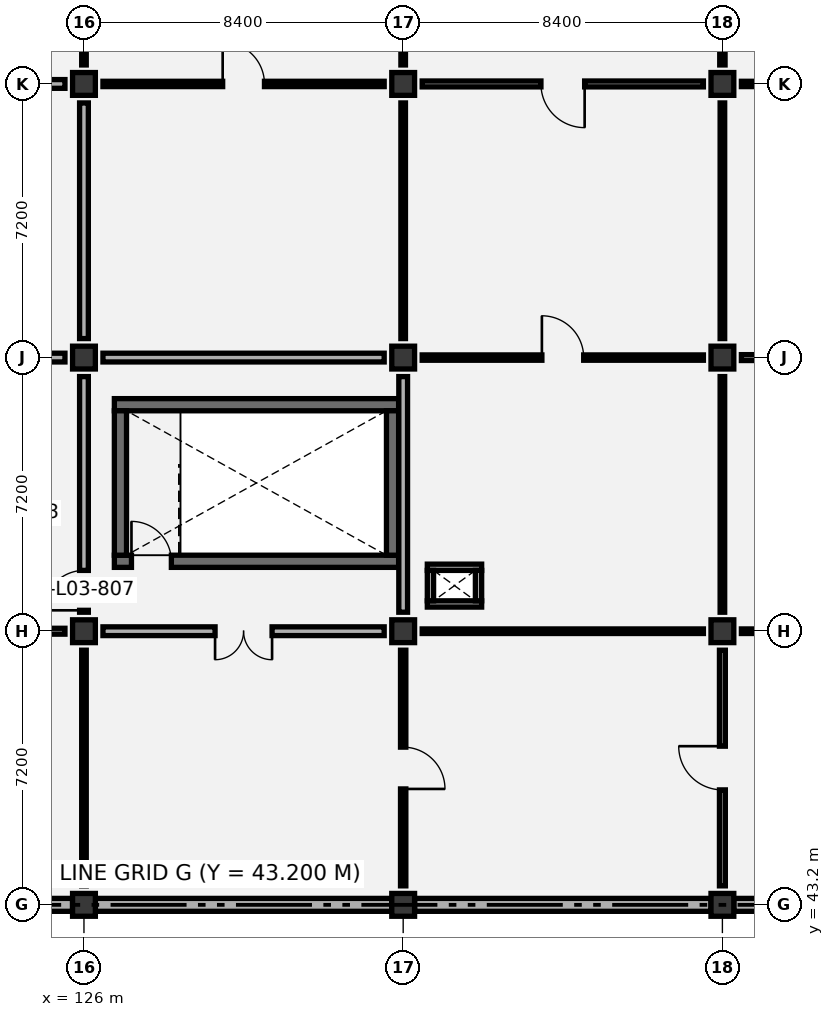
"""IFC4 building model, lengths in metres.
Left out: names, types, materials, properties, quantities, classifications, styles, units other than length and angle.
Written with IfcOpenShell. Run it as: python <this file> out.ifc"""

import sys

from ifc_helpers import new_model, si_unit, direction, frame, frame_2d, origin, origin_2d, place, context, subcontext, project, spatial, rectangle, extrude, element, fill, save


model = new_model("IFC4")
c1 = context("Model", 3, precision=1e-05, world=origin(), true_north=direction((0.0, 1.0)))
c2 = subcontext(c1, "Body", "Model", "MODEL_VIEW")
j1 = project(units=[si_unit("LENGTHUNIT", "METRE"), si_unit("PLANEANGLEUNIT", "RADIAN")], contexts=[c1])
p1 = place(None, origin())
s1 = spatial("IfcSite", under=j1, at=p1, CompositionType="ELEMENT")
p2 = place(p1, origin())
s2 = spatial("IfcBuilding", under=s1, at=p2, CompositionType="ELEMENT")
p3 = place(p2, frame((0.0, 0.0, 16.8)))
s3 = spatial("IfcBuildingStorey", under=s2, at=p3, CompositionType="ELEMENT", Elevation=16.8)
for number, where, z_axis, x_axis in (
    (1, (126.0, 43.2, 0.0), (0.0, 0.0, 1.0), (1.0, 0.0, 0.0)),
    (2, (126.0, 50.4, 0.0), (0.0, 0.0, 1.0), (1.0, 0.0, 0.0)),
    (3, (126.0, 57.6, 0.0), (0.0, 0.0, 1.0), (1.0, 0.0, 0.0)),
    (4, (126.0, 64.8, 0.0), (0.0, 0.0, 1.0), (1.0, 0.0, 0.0)),
    (5, (134.4, 43.2, 0.0), (0.0, 0.0, 1.0), (1.0, 0.0, 0.0)),
    (6, (134.4, 50.4, 0.0), (0.0, 0.0, 1.0), (1.0, 0.0, 0.0)),
    (7, (134.4, 57.6, 0.0), (0.0, 0.0, 1.0), (1.0, 0.0, 0.0)),
    (8, (134.4, 64.8, 0.0), (0.0, 0.0, 1.0), (1.0, 0.0, 0.0)),
    (9, (142.8, 43.2, 0.0), (0.0, 0.0, 1.0), (1.0, 0.0, 0.0)),
    (10, (142.8, 50.4, 0.0), (0.0, 0.0, 1.0), (1.0, 0.0, 0.0)),
    (11, (142.8, 57.6, 0.0), (0.0, 0.0, 1.0), (1.0, 0.0, 0.0)),
    (12, (142.8, 64.8, 0.0), (0.0, 0.0, 1.0), (1.0, 0.0, 0.0)),
):
    element("IfcColumn", number, at=place(p3, frame(where, z_axis=z_axis, x_axis=x_axis)), inside=s3, PredefinedType="COLUMN", context=c2, shape_type="SweptSolid", body=[
        extrude(rectangle(XDim=0.6, YDim=0.6, at=origin_2d()), origin(), (0.0, 0.0, 1.0), 5.4),
    ])
p4 = place(p3, frame((126.8, 52.24, 0.0), z_axis=(0.0, 0.0, 1.0), x_axis=(1.0, 0.0, 0.0)))
e13 = element("IfcWall", 13, at=p4, inside=s3, PredefinedType="SHEAR", context=c2, shape_type="SweptSolid", body=[
    extrude(rectangle(XDim=7.48, YDim=0.32, at=frame_2d((3.74, 0.0))), origin(), (0.0, 0.0, 1.0), 5.05),
])
p5 = place(p4, frame((0.45, 0.0, 0.0)))
e14 = element("IfcOpeningElement", 14, at=p5, cuts=e13, PredefinedType="OPENING", context=c2, shape_type="SweptSolid", body=[
    extrude(rectangle(XDim=1.05, YDim=2.15, at=frame_2d((0.525, 1.075))), frame((0.0, 0.17, 0.0), z_axis=(0.0, -1.0, 0.0), x_axis=(1.0, 0.0, 0.0)), (0.0, 0.0, 1.0), 0.34),
])
p6 = place(p3, frame((126.8, 56.36, 0.0), z_axis=(0.0, 0.0, 1.0), x_axis=(1.0, 0.0, 0.0)))
e15 = element("IfcWall", 15, at=p6, inside=s3, PredefinedType="SHEAR", context=c2, shape_type="SweptSolid", body=[
    extrude(rectangle(XDim=7.48, YDim=0.32, at=frame_2d((3.74, 0.0))), origin(), (0.0, 0.0, 1.0), 5.05),
])
for number, where, z_axis, x_axis in (
    (16, (126.96, 52.4, 0.0), (0.0, 0.0, 1.0), (0.0, 1.0, 0.0)),
    (17, (134.12, 52.4, 0.0), (0.0, 0.0, 1.0), (0.0, 1.0, 0.0)),
):
    element("IfcWall", number, at=place(p3, frame(where, z_axis=z_axis, x_axis=x_axis)), inside=s3, PredefinedType="SHEAR", context=c2, shape_type="SweptSolid", body=[
        extrude(rectangle(XDim=3.8, YDim=0.32, at=frame_2d((1.9, 0.0))), origin(), (0.0, 0.0, 1.0), 5.05),
    ])
p7 = place(p3, frame((118.0, 43.2, 0.0), z_axis=(0.0, 0.0, 1.0), x_axis=(1.0, 0.0, 0.0)))
e18 = element("IfcWall", 18, at=p7, inside=s3, PredefinedType="SOLIDWALL", context=c2, shape_type="SweptSolid", body=[
    extrude(rectangle(XDim=7.7, YDim=0.34, at=frame_2d((3.85, 0.0))), origin(), (0.0, 0.0, 1.0), 4.395),
])
for number, where, z_axis, x_axis in (
    (19, (126.3, 43.2, 0.0), (0.0, 0.0, 1.0), (1.0, 0.0, 0.0)),
    (20, (134.7, 43.2, 0.0), (0.0, 0.0, 1.0), (1.0, 0.0, 0.0)),
):
    element("IfcWall", number, at=place(p3, frame(where, z_axis=z_axis, x_axis=x_axis)), inside=s3, PredefinedType="SOLIDWALL", context=c2, shape_type="SweptSolid", body=[
        extrude(rectangle(XDim=7.8, YDim=0.34, at=frame_2d((3.9, 0.0))), origin(), (0.0, 0.0, 1.0), 4.395),
    ])
p8 = place(p3, frame((143.1, 43.2, 0.0), z_axis=(0.0, 0.0, 1.0), x_axis=(1.0, 0.0, 0.0)))
e21 = element("IfcWall", 21, at=p8, inside=s3, PredefinedType="SOLIDWALL", context=c2, shape_type="SweptSolid", body=[
    extrude(rectangle(XDim=7.8, YDim=0.34, at=frame_2d((3.9, 0.0))), origin(), (0.0, 0.0, 1.0), 4.395),
])
for number, where, z_axis, x_axis in (
    (22, (135.035, 51.117, 0.0), (0.0, 0.0, 1.0), (1.0, 0.0, 0.0)),
    (23, (135.035, 52.083, 0.0), (0.0, 0.0, 1.0), (1.0, 0.0, 0.0)),
):
    element("IfcWall", number, at=place(p3, frame(where, z_axis=z_axis, x_axis=x_axis)), inside=s3, PredefinedType="PARTITIONING", context=c2, shape_type="SweptSolid", body=[
        extrude(rectangle(XDim=1.43, YDim=0.165, at=frame_2d((0.715, 0.0))), origin(), (0.0, 0.0, 1.0), 4.825),
    ])
for number, where, z_axis, x_axis in (
    (24, (135.117, 51.2, 0.0), (0.0, 0.0, 1.0), (0.0, 1.0, 0.0)),
    (25, (136.383, 51.2, 0.0), (0.0, 0.0, 1.0), (0.0, 1.0, 0.0)),
):
    element("IfcWall", number, at=place(p3, frame(where, z_axis=z_axis, x_axis=x_axis)), inside=s3, PredefinedType="PARTITIONING", context=c2, shape_type="SweptSolid", body=[
        extrude(rectangle(XDim=0.8, YDim=0.165, at=frame_2d((0.4, 0.0))), origin(), (0.0, 0.0, 1.0), 4.825),
    ])
p9 = place(p3, frame((126.0, 43.7, 0.0), z_axis=(0.0, 0.0, 1.0), x_axis=(0.0, 1.0, 0.0)))
e26 = element("IfcWall", 26, at=p9, inside=s3, PredefinedType="PARTITIONING", context=c2, shape_type="SweptSolid", body=[
    extrude(rectangle(XDim=6.2, YDim=0.12, at=frame_2d((3.1, 0.0))), origin(), (0.0, 0.0, 1.0), 4.645),
])
p10 = place(p3, frame((118.1, 50.4, 0.0), z_axis=(0.0, 0.0, 1.0), x_axis=(1.0, 0.0, 0.0)))
e27 = element("IfcWall", 27, at=p10, inside=s3, PredefinedType="PARTITIONING", context=c2, shape_type="SweptSolid", body=[
    extrude(rectangle(XDim=7.4, YDim=0.155, at=frame_2d((3.7, 0.0))), origin(), (0.0, 0.0, 1.0), 4.295),
])
p11 = place(p10, frame((3.15, 0.0, 0.0)))
e28 = element("IfcOpeningElement", 28, at=p11, cuts=e27, PredefinedType="OPENING", context=c2, shape_type="SweptSolid", body=[
    extrude(rectangle(XDim=1.1, YDim=2.1, at=frame_2d((0.55, 1.05))), frame((0.0, 0.087, 0.0), z_axis=(0.0, -1.0, 0.0), x_axis=(1.0, 0.0, 0.0)), (0.0, 0.0, 1.0), 0.175),
])
p12 = place(p3, frame((126.0, 50.9, 0.0), z_axis=(0.0, 0.0, 1.0), x_axis=(0.0, 1.0, 0.0)))
e29 = element("IfcWall", 29, at=p12, inside=s3, PredefinedType="PARTITIONING", context=c2, shape_type="SweptSolid", body=[
    extrude(rectangle(XDim=6.2, YDim=0.23, at=frame_2d((3.1, 0.0))), origin(), (0.0, 0.0, 1.0), 4.345),
])
p13 = place(p12, frame((0.05, 0.0, 0.0)))
e30 = element("IfcOpeningElement", 30, at=p13, cuts=e29, PredefinedType="OPENING", context=c2, shape_type="SweptSolid", body=[
    extrude(rectangle(XDim=1.05, YDim=2.15, at=frame_2d((0.525, 1.075))), frame((0.0, 0.125, 0.0), z_axis=(0.0, -1.0, 0.0), x_axis=(1.0, 0.0, 0.0)), (0.0, 0.0, 1.0), 0.25),
])
p14 = place(p3, frame((118.1, 57.6, 0.0), z_axis=(0.0, 0.0, 1.0), x_axis=(1.0, 0.0, 0.0)))
e31 = element("IfcWall", 31, at=p14, inside=s3, PredefinedType="PARTITIONING", context=c2, shape_type="SweptSolid", body=[
    extrude(rectangle(XDim=7.4, YDim=0.23, at=frame_2d((3.7, 0.0))), origin(), (0.0, 0.0, 1.0), 4.295),
])
p15 = place(p14, frame((2.95, 0.0, 0.0)))
e32 = element("IfcOpeningElement", 32, at=p15, cuts=e31, PredefinedType="OPENING", context=c2, shape_type="SweptSolid", body=[
    extrude(rectangle(XDim=1.5, YDim=2.15, at=frame_2d((0.75, 1.075))), frame((0.0, 0.125, 0.0), z_axis=(0.0, -1.0, 0.0), x_axis=(1.0, 0.0, 0.0)), (0.0, 0.0, 1.0), 0.25),
])
p16 = place(p3, frame((126.0, 58.1, 0.0), z_axis=(0.0, 0.0, 1.0), x_axis=(0.0, 1.0, 0.0)))
e33 = element("IfcWall", 33, at=p16, inside=s3, PredefinedType="PARTITIONING", context=c2, shape_type="SweptSolid", body=[
    extrude(rectangle(XDim=6.2, YDim=0.23, at=frame_2d((3.1, 0.0))), origin(), (0.0, 0.0, 1.0), 4.755),
])
p17 = place(p3, frame((118.1, 64.8, 0.0), z_axis=(0.0, 0.0, 1.0), x_axis=(1.0, 0.0, 0.0)))
e34 = element("IfcWall", 34, at=p17, inside=s3, PredefinedType="PARTITIONING", context=c2, shape_type="SweptSolid", body=[
    extrude(rectangle(XDim=7.4, YDim=0.23, at=frame_2d((3.7, 0.0))), origin(), (0.0, 0.0, 1.0), 4.295),
])
p18 = place(p3, frame((126.0, 65.3, 0.0), z_axis=(0.0, 0.0, 1.0), x_axis=(0.0, 1.0, 0.0)))
e35 = element("IfcWall", 35, at=p18, inside=s3, PredefinedType="PARTITIONING", context=c2, shape_type="SweptSolid", body=[
    extrude(rectangle(XDim=6.2, YDim=0.12, at=frame_2d((3.1, 0.0))), origin(), (0.0, 0.0, 1.0), 4.345),
])
p19 = place(p3, frame((134.4, 43.7, 0.0), z_axis=(0.0, 0.0, 1.0), x_axis=(0.0, 1.0, 0.0)))
e36 = element("IfcWall", 36, at=p19, inside=s3, PredefinedType="PARTITIONING", context=c2, shape_type="SweptSolid", body=[
    extrude(rectangle(XDim=6.2, YDim=0.14, at=frame_2d((3.1, 0.0))), origin(), (0.0, 0.0, 1.0), 4.345),
])
p20 = place(p19, frame((2.55, 0.0, 0.0)))
e37 = element("IfcOpeningElement", 37, at=p20, cuts=e36, PredefinedType="OPENING", context=c2, shape_type="SweptSolid", body=[
    extrude(rectangle(XDim=1.1, YDim=2.1, at=frame_2d((0.55, 1.05))), frame((0.0, 0.08, 0.0), z_axis=(0.0, -1.0, 0.0), x_axis=(1.0, 0.0, 0.0)), (0.0, 0.0, 1.0), 0.16),
])
p21 = place(p3, frame((126.5, 50.4, 0.0), z_axis=(0.0, 0.0, 1.0), x_axis=(1.0, 0.0, 0.0)))
e38 = element("IfcWall", 38, at=p21, inside=s3, PredefinedType="PARTITIONING", context=c2, shape_type="SweptSolid", body=[
    extrude(rectangle(XDim=7.4, YDim=0.23, at=frame_2d((3.7, 0.0))), origin(), (0.0, 0.0, 1.0), 4.295),
])
p22 = place(p21, frame((2.95, 0.0, 0.0)))
e39 = element("IfcOpeningElement", 39, at=p22, cuts=e38, PredefinedType="OPENING", context=c2, shape_type="SweptSolid", body=[
    extrude(rectangle(XDim=1.5, YDim=2.15, at=frame_2d((0.75, 1.075))), frame((0.0, 0.125, 0.0), z_axis=(0.0, -1.0, 0.0), x_axis=(1.0, 0.0, 0.0)), (0.0, 0.0, 1.0), 0.25),
])
p23 = place(p3, frame((134.4, 50.9, 0.0), z_axis=(0.0, 0.0, 1.0), x_axis=(0.0, 1.0, 0.0)))
e40 = element("IfcWall", 40, at=p23, inside=s3, PredefinedType="PARTITIONING", context=c2, shape_type="SweptSolid", body=[
    extrude(rectangle(XDim=6.2, YDim=0.23, at=frame_2d((3.1, 0.0))), origin(), (0.0, 0.0, 1.0), 4.755),
])
p24 = place(p3, frame((126.5, 57.6, 0.0), z_axis=(0.0, 0.0, 1.0), x_axis=(1.0, 0.0, 0.0)))
e41 = element("IfcWall", 41, at=p24, inside=s3, PredefinedType="PARTITIONING", context=c2, shape_type="SweptSolid", body=[
    extrude(rectangle(XDim=7.4, YDim=0.23, at=frame_2d((3.7, 0.0))), origin(), (0.0, 0.0, 1.0), 4.295),
])
p25 = place(p3, frame((134.4, 58.1, 0.0), z_axis=(0.0, 0.0, 1.0), x_axis=(0.0, 1.0, 0.0)))
e42 = element("IfcWall", 42, at=p25, inside=s3, PredefinedType="PARTITIONING", context=c2, shape_type="SweptSolid", body=[
    extrude(rectangle(XDim=6.2, YDim=0.12, at=frame_2d((3.1, 0.0))), origin(), (0.0, 0.0, 1.0), 4.345),
])
p26 = place(p3, frame((126.5, 64.8, 0.0), z_axis=(0.0, 0.0, 1.0), x_axis=(1.0, 0.0, 0.0)))
e43 = element("IfcWall", 43, at=p26, inside=s3, PredefinedType="PARTITIONING", context=c2, shape_type="SweptSolid", body=[
    extrude(rectangle(XDim=7.4, YDim=0.14, at=frame_2d((3.7, 0.0))), origin(), (0.0, 0.0, 1.0), 4.295),
])
p27 = place(p26, frame((3.15, 0.0, 0.0)))
e44 = element("IfcOpeningElement", 44, at=p27, cuts=e43, PredefinedType="OPENING", context=c2, shape_type="SweptSolid", body=[
    extrude(rectangle(XDim=1.1, YDim=2.1, at=frame_2d((0.55, 1.05))), frame((0.0, 0.08, 0.0), z_axis=(0.0, -1.0, 0.0), x_axis=(1.0, 0.0, 0.0)), (0.0, 0.0, 1.0), 0.16),
])
p28 = place(p3, frame((134.4, 65.3, 0.0), z_axis=(0.0, 0.0, 1.0), x_axis=(0.0, 1.0, 0.0)))
e45 = element("IfcWall", 45, at=p28, inside=s3, PredefinedType="PARTITIONING", context=c2, shape_type="SweptSolid", body=[
    extrude(rectangle(XDim=6.2, YDim=0.12, at=frame_2d((3.1, 0.0))), origin(), (0.0, 0.0, 1.0), 4.545),
])
p29 = place(p3, frame((142.8, 43.7, 0.0), z_axis=(0.0, 0.0, 1.0), x_axis=(0.0, 1.0, 0.0)))
e46 = element("IfcWall", 46, at=p29, inside=s3, PredefinedType="PARTITIONING", context=c2, shape_type="SweptSolid", body=[
    extrude(rectangle(XDim=6.2, YDim=0.155, at=frame_2d((3.1, 0.0))), origin(), (0.0, 0.0, 1.0), 4.755),
])
p30 = place(p29, frame((2.525, 0.0, 0.0)))
e47 = element("IfcOpeningElement", 47, at=p30, cuts=e46, PredefinedType="OPENING", context=c2, shape_type="SweptSolid", body=[
    extrude(rectangle(XDim=1.15, YDim=2.1, at=frame_2d((0.575, 1.05))), frame((0.0, 0.087, 0.0), z_axis=(0.0, -1.0, 0.0), x_axis=(1.0, 0.0, 0.0)), (0.0, 0.0, 1.0), 0.175),
])
p31 = place(p3, frame((134.9, 50.4, 0.0), z_axis=(0.0, 0.0, 1.0), x_axis=(1.0, 0.0, 0.0)))
e48 = element("IfcWall", 48, at=p31, inside=s3, PredefinedType="PARTITIONING", context=c2, shape_type="SweptSolid", body=[
    extrude(rectangle(XDim=7.4, YDim=0.12, at=frame_2d((3.7, 0.0))), origin(), (0.0, 0.0, 1.0), 4.295),
])
p32 = place(p3, frame((142.8, 50.9, 0.0), z_axis=(0.0, 0.0, 1.0), x_axis=(0.0, 1.0, 0.0)))
e49 = element("IfcWall", 49, at=p32, inside=s3, PredefinedType="PARTITIONING", context=c2, shape_type="SweptSolid", body=[
    extrude(rectangle(XDim=6.2, YDim=0.12, at=frame_2d((3.1, 0.0))), origin(), (0.0, 0.0, 1.0), 4.345),
])
p33 = place(p3, frame((134.9, 57.6, 0.0), z_axis=(0.0, 0.0, 1.0), x_axis=(1.0, 0.0, 0.0)))
e50 = element("IfcWall", 50, at=p33, inside=s3, PredefinedType="PARTITIONING", context=c2, shape_type="SweptSolid", body=[
    extrude(rectangle(XDim=7.4, YDim=0.14, at=frame_2d((3.7, 0.0))), origin(), (0.0, 0.0, 1.0), 4.295),
])
p34 = place(p33, frame((3.15, 0.0, 0.0)))
e51 = element("IfcOpeningElement", 51, at=p34, cuts=e50, PredefinedType="OPENING", context=c2, shape_type="SweptSolid", body=[
    extrude(rectangle(XDim=1.1, YDim=2.1, at=frame_2d((0.55, 1.05))), frame((0.0, 0.08, 0.0), z_axis=(0.0, -1.0, 0.0), x_axis=(1.0, 0.0, 0.0)), (0.0, 0.0, 1.0), 0.16),
])
p35 = place(p3, frame((142.8, 58.1, 0.0), z_axis=(0.0, 0.0, 1.0), x_axis=(0.0, 1.0, 0.0)))
e52 = element("IfcWall", 52, at=p35, inside=s3, PredefinedType="PARTITIONING", context=c2, shape_type="SweptSolid", body=[
    extrude(rectangle(XDim=6.2, YDim=0.12, at=frame_2d((3.1, 0.0))), origin(), (0.0, 0.0, 1.0), 4.545),
])
p36 = place(p3, frame((134.9, 64.8, 0.0), z_axis=(0.0, 0.0, 1.0), x_axis=(1.0, 0.0, 0.0)))
e53 = element("IfcWall", 53, at=p36, inside=s3, PredefinedType="PARTITIONING", context=c2, shape_type="SweptSolid", body=[
    extrude(rectangle(XDim=7.4, YDim=0.155, at=frame_2d((3.7, 0.0))), origin(), (0.0, 0.0, 1.0), 4.295),
])
p37 = place(p36, frame((3.125, 0.0, 0.0)))
e54 = element("IfcOpeningElement", 54, at=p37, cuts=e53, PredefinedType="OPENING", context=c2, shape_type="SweptSolid", body=[
    extrude(rectangle(XDim=1.15, YDim=2.1, at=frame_2d((0.575, 1.05))), frame((0.0, 0.087, 0.0), z_axis=(0.0, -1.0, 0.0), x_axis=(1.0, 0.0, 0.0)), (0.0, 0.0, 1.0), 0.175),
])
p38 = place(p3, frame((142.8, 65.3, 0.0), z_axis=(0.0, 0.0, 1.0), x_axis=(0.0, 1.0, 0.0)))
e55 = element("IfcWall", 55, at=p38, inside=s3, PredefinedType="PARTITIONING", context=c2, shape_type="SweptSolid", body=[
    extrude(rectangle(XDim=6.2, YDim=0.14, at=frame_2d((3.1, 0.0))), origin(), (0.0, 0.0, 1.0), 4.345),
])
p39 = place(p38, frame((2.55, 0.0, 0.0)))
e56 = element("IfcOpeningElement", 56, at=p39, cuts=e55, PredefinedType="OPENING", context=c2, shape_type="SweptSolid", body=[
    extrude(rectangle(XDim=1.1, YDim=2.1, at=frame_2d((0.55, 1.05))), frame((0.0, 0.08, 0.0), z_axis=(0.0, -1.0, 0.0), x_axis=(1.0, 0.0, 0.0)), (0.0, 0.0, 1.0), 0.16),
])
p40 = place(p3, frame((143.3, 50.4, 0.0), z_axis=(0.0, 0.0, 1.0), x_axis=(1.0, 0.0, 0.0)))
e57 = element("IfcWall", 57, at=p40, inside=s3, PredefinedType="PARTITIONING", context=c2, shape_type="SweptSolid", body=[
    extrude(rectangle(XDim=7.4, YDim=0.12, at=frame_2d((3.7, 0.0))), origin(), (0.0, 0.0, 1.0), 4.295),
])
p41 = place(p3, frame((143.3, 57.6, 0.0), z_axis=(0.0, 0.0, 1.0), x_axis=(1.0, 0.0, 0.0)))
e58 = element("IfcWall", 58, at=p41, inside=s3, PredefinedType="PARTITIONING", context=c2, shape_type="SweptSolid", body=[
    extrude(rectangle(XDim=7.4, YDim=0.155, at=frame_2d((3.7, 0.0))), origin(), (0.0, 0.0, 1.0), 4.295),
])
p42 = place(p41, frame((3.15, 0.0, 0.0)))
e59 = element("IfcOpeningElement", 59, at=p42, cuts=e58, PredefinedType="OPENING", context=c2, shape_type="SweptSolid", body=[
    extrude(rectangle(XDim=1.1, YDim=2.1, at=frame_2d((0.55, 1.05))), frame((0.0, 0.087, 0.0), z_axis=(0.0, -1.0, 0.0), x_axis=(1.0, 0.0, 0.0)), (0.0, 0.0, 1.0), 0.175),
])
p43 = place(p3, frame((143.3, 64.8, 0.0), z_axis=(0.0, 0.0, 1.0), x_axis=(1.0, 0.0, 0.0)))
e60 = element("IfcWall", 60, at=p43, inside=s3, PredefinedType="PARTITIONING", context=c2, shape_type="SweptSolid", body=[
    extrude(rectangle(XDim=7.4, YDim=0.14, at=frame_2d((3.7, 0.0))), origin(), (0.0, 0.0, 1.0), 4.295),
])
p44 = place(p43, frame((3.125, 0.0, 0.0)))
e61 = element("IfcOpeningElement", 61, at=p44, cuts=e60, PredefinedType="OPENING", context=c2, shape_type="SweptSolid", body=[
    extrude(rectangle(XDim=1.15, YDim=2.1, at=frame_2d((0.575, 1.05))), frame((0.0, 0.08, 0.0), z_axis=(0.0, -1.0, 0.0), x_axis=(1.0, 0.0, 0.0)), (0.0, 0.0, 1.0), 0.16),
])
p45 = place(p5, origin())
e62 = element("IfcDoor", 62, at=p45, inside=s3, OperationType="SINGLE_SWING_LEFT", PredefinedType="DOOR", context=c2, shape_type="SweptSolid", body=[
    extrude(rectangle(XDim=1.05, YDim=2.15, at=frame_2d((0.525, 1.075))), frame((0.0, 0.025, 0.0), z_axis=(0.0, -1.0, 0.0), x_axis=(1.0, 0.0, 0.0)), (0.0, 0.0, 1.0), 0.05),
])
fill(e14, e62)
p46 = place(p13, origin())
e63 = element("IfcDoor", 63, at=p46, inside=s3, OperationType="SINGLE_SWING_LEFT", PredefinedType="DOOR", context=c2, shape_type="SweptSolid", body=[
    extrude(rectangle(XDim=1.05, YDim=2.15, at=frame_2d((0.525, 1.075))), frame((0.0, 0.025, 0.0), z_axis=(0.0, -1.0, 0.0), x_axis=(1.0, 0.0, 0.0)), (0.0, 0.0, 1.0), 0.05),
])
fill(e30, e63)
p47 = place(p20, frame((1.1, 0.0, 0.0), z_axis=(0.0, 0.0, 1.0), x_axis=(-1.0, 0.0, 0.0)))
e64 = element("IfcDoor", 64, at=p47, inside=s3, OperationType="SINGLE_SWING_RIGHT", PredefinedType="DOOR", context=c2, shape_type="SweptSolid", body=[
    extrude(rectangle(XDim=1.1, YDim=2.1, at=frame_2d((0.55, 1.05))), frame((0.0, 0.025, 0.0), z_axis=(0.0, -1.0, 0.0), x_axis=(1.0, 0.0, 0.0)), (0.0, 0.0, 1.0), 0.05),
])
fill(e37, e64)
p48 = place(p22, frame((1.5, 0.0, 0.0), z_axis=(0.0, 0.0, 1.0), x_axis=(-1.0, 0.0, 0.0)))
e65 = element("IfcDoor", 65, at=p48, inside=s3, OperationType="DOUBLE_DOOR_SINGLE_SWING", PredefinedType="DOOR", context=c2, shape_type="SweptSolid", body=[
    extrude(rectangle(XDim=1.5, YDim=2.15, at=frame_2d((0.75, 1.075))), frame((0.0, 0.025, 0.0), z_axis=(0.0, -1.0, 0.0), x_axis=(1.0, 0.0, 0.0)), (0.0, 0.0, 1.0), 0.05),
])
fill(e39, e65)
p49 = place(p27, origin())
e66 = element("IfcDoor", 66, at=p49, inside=s3, OperationType="SINGLE_SWING_LEFT", PredefinedType="DOOR", context=c2, shape_type="SweptSolid", body=[
    extrude(rectangle(XDim=1.1, YDim=2.1, at=frame_2d((0.55, 1.05))), frame((0.0, 0.025, 0.0), z_axis=(0.0, -1.0, 0.0), x_axis=(1.0, 0.0, 0.0)), (0.0, 0.0, 1.0), 0.05),
])
fill(e44, e66)
p50 = place(p30, origin())
e67 = element("IfcDoor", 67, at=p50, inside=s3, OperationType="SINGLE_SWING_RIGHT", PredefinedType="DOOR", context=c2, shape_type="SweptSolid", body=[
    extrude(rectangle(XDim=1.15, YDim=2.1, at=frame_2d((0.575, 1.05))), frame((0.0, 0.025, 0.0), z_axis=(0.0, -1.0, 0.0), x_axis=(1.0, 0.0, 0.0)), (0.0, 0.0, 1.0), 0.05),
])
fill(e47, e67)
p51 = place(p34, origin())
e68 = element("IfcDoor", 68, at=p51, inside=s3, OperationType="SINGLE_SWING_LEFT", PredefinedType="DOOR", context=c2, shape_type="SweptSolid", body=[
    extrude(rectangle(XDim=1.1, YDim=2.1, at=frame_2d((0.55, 1.05))), frame((0.0, 0.025, 0.0), z_axis=(0.0, -1.0, 0.0), x_axis=(1.0, 0.0, 0.0)), (0.0, 0.0, 1.0), 0.05),
])
fill(e51, e68)
p52 = place(p37, frame((1.15, 0.0, 0.0), z_axis=(0.0, 0.0, 1.0), x_axis=(-1.0, 0.0, 0.0)))
e69 = element("IfcDoor", 69, at=p52, inside=s3, OperationType="SINGLE_SWING_LEFT", PredefinedType="DOOR", context=c2, shape_type="SweptSolid", body=[
    extrude(rectangle(XDim=1.15, YDim=2.1, at=frame_2d((0.575, 1.05))), frame((0.0, 0.025, 0.0), z_axis=(0.0, -1.0, 0.0), x_axis=(1.0, 0.0, 0.0)), (0.0, 0.0, 1.0), 0.05),
])
fill(e54, e69)
save(model, sys.argv[1])
